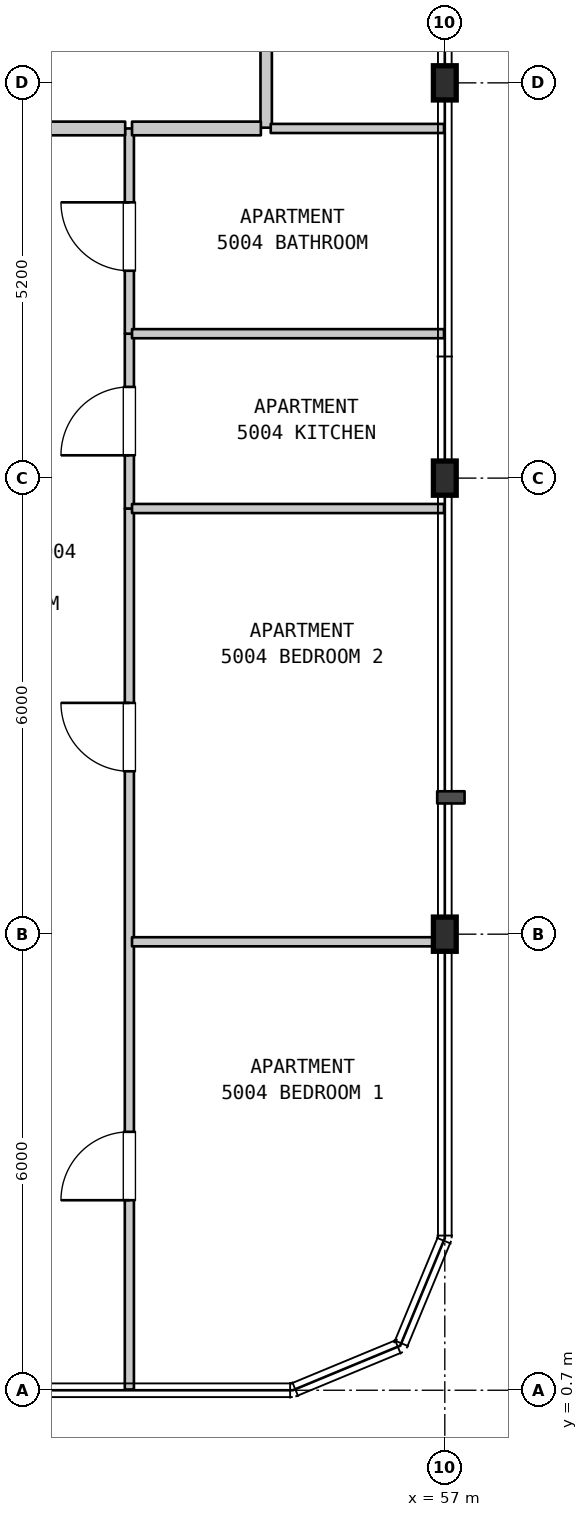
"""IFC4 building model, lengths in metres.
Left out: names, types, materials, properties, quantities, classifications, styles, units other than length and angle.
Written with IfcOpenShell. Run it as: python <this file> out.ifc"""

import sys

from ifc_helpers import new_model, si_unit, direction, frame, frame_2d, origin, origin_2d, place, context, subcontext, project, spatial, rectangle, i_section, extrude, element, fill, save


model = new_model("IFC4")
c1 = context("Model", 3, precision=1e-05, world=origin(), true_north=direction((0.0, 1.0)))
c2 = subcontext(c1, "Body", "Model", "MODEL_VIEW")
j1 = project(units=[si_unit("LENGTHUNIT", "METRE"), si_unit("PLANEANGLEUNIT", "RADIAN")], contexts=[c1])
p1 = place(None, origin())
s1 = spatial("IfcSite", under=j1, at=p1, CompositionType="ELEMENT")
p2 = place(p1, origin())
s2 = spatial("IfcBuilding", under=s1, at=p2, CompositionType="ELEMENT")
p3 = place(p2, frame((0.0, 0.0, 203.2)))
s3 = spatial("IfcBuildingStorey", under=s2, at=p3, CompositionType="ELEMENT", Elevation=203.2)
for number, where, z_axis, x_axis in (
    (1, (57.0, 6.7, 0.0), (0.0, 0.0, 1.0), (1.0, 0.0, 0.0)),
    (2, (57.0, 12.7, 0.0), (0.0, 0.0, 1.0), (1.0, 0.0, 0.0)),
    (3, (57.0, 17.9, 0.0), (0.0, 0.0, 1.0), (1.0, 0.0, 0.0)),
):
    element("IfcColumn", number, at=place(p3, frame(where, z_axis=z_axis, x_axis=x_axis)), inside=s3, PredefinedType="COLUMN", context=c2, shape_type="SweptSolid", body=[
        extrude(i_section(OverallWidth=0.3, OverallDepth=0.45, WebThickness=0.014, FlangeThickness=0.026, FilletRadius=0.027, at=origin_2d()), origin(), (0.0, 0.0, 1.0), 3.7),
    ])
p4 = place(p3, frame((52.85, 0.71, 0.0), z_axis=(0.0, 0.0, 1.0), x_axis=(0.0, 1.0, 0.0)))
e4 = element("IfcWall", 4, at=p4, inside=s3, PredefinedType="PARTITIONING", context=c2, shape_type="SweptSolid", body=[
    extrude(rectangle(XDim=11.59, YDim=0.12, at=frame_2d((5.795, 0.0))), origin(), (0.0, 0.0, 1.0), 3.39),
])
p5 = place(p4, frame((2.49, 0.0, 0.0)))
e5 = element("IfcOpeningElement", 5, at=p5, cuts=e4, PredefinedType="OPENING", context=c2, shape_type="SweptSolid", body=[
    extrude(rectangle(XDim=0.9, YDim=2.15, at=frame_2d((0.45, 1.075))), frame((0.0, 0.07, 0.0), z_axis=(0.0, -1.0, 0.0), x_axis=(1.0, 0.0, 0.0)), (0.0, 0.0, 1.0), 0.14),
])
p6 = place(p4, frame((8.133, 0.0, 0.0)))
e6 = element("IfcOpeningElement", 6, at=p6, cuts=e4, PredefinedType="OPENING", context=c2, shape_type="SweptSolid", body=[
    extrude(rectangle(XDim=0.9, YDim=2.15, at=frame_2d((0.45, 1.075))), frame((0.0, 0.07, 0.0), z_axis=(0.0, -1.0, 0.0), x_axis=(1.0, 0.0, 0.0)), (0.0, 0.0, 1.0), 0.14),
])
p7 = place(p3, frame((52.85, 12.3, 0.0), z_axis=(0.0, 0.0, 1.0), x_axis=(0.0, 1.0, 0.0)))
e7 = element("IfcWall", 7, at=p7, inside=s3, PredefinedType="PARTITIONING", context=c2, shape_type="SweptSolid", body=[
    extrude(rectangle(XDim=2.3, YDim=0.12, at=frame_2d((1.15, 0.0))), origin(), (0.0, 0.0, 1.0), 3.39),
])
p8 = place(p7, frame((0.7, 0.0, 0.0)))
e8 = element("IfcOpeningElement", 8, at=p8, cuts=e7, PredefinedType="OPENING", context=c2, shape_type="SweptSolid", body=[
    extrude(rectangle(XDim=0.9, YDim=2.15, at=frame_2d((0.45, 1.075))), frame((0.0, 0.07, 0.0), z_axis=(0.0, -1.0, 0.0), x_axis=(1.0, 0.0, 0.0)), (0.0, 0.0, 1.0), 0.14),
])
p9 = place(p3, frame((52.85, 14.6, 0.0), z_axis=(0.0, 0.0, 1.0), x_axis=(0.0, 1.0, 0.0)))
e9 = element("IfcWall", 9, at=p9, inside=s3, PredefinedType="PARTITIONING", context=c2, shape_type="SweptSolid", body=[
    extrude(rectangle(XDim=2.7, YDim=0.12, at=frame_2d((1.35, 0.0))), origin(), (0.0, 0.0, 1.0), 3.39),
])
p10 = place(p9, frame((0.828, 0.0, 0.0)))
e10 = element("IfcOpeningElement", 10, at=p10, cuts=e9, PredefinedType="OPENING", context=c2, shape_type="SweptSolid", body=[
    extrude(rectangle(XDim=0.9, YDim=2.1, at=frame_2d((0.45, 1.05))), frame((0.0, 0.07, 0.0), z_axis=(0.0, -1.0, 0.0), x_axis=(1.0, 0.0, 0.0)), (0.0, 0.0, 1.0), 0.14),
])
p11 = place(p3, frame((54.65, 17.31, 0.0), z_axis=(0.0, 0.0, 1.0), x_axis=(0.0, 1.0, 0.0)))
e11 = element("IfcWall", 11, at=p11, inside=s3, PredefinedType="STANDARD", context=c2, shape_type="SweptSolid", body=[
    extrude(rectangle(XDim=2.19, YDim=0.15, at=frame_2d((1.095, 0.0))), origin(), (0.0, 0.0, 1.0), 3.39),
])
p12 = place(p3, frame((52.885, 6.6, 0.0), z_axis=(0.0, 0.0, 1.0), x_axis=(1.0, 0.0, 0.0)))
e12 = element("IfcWall", 12, at=p12, inside=s3, PredefinedType="PARTITIONING", context=c2, shape_type="SweptSolid", body=[
    extrude(rectangle(XDim=4.105, YDim=0.12, at=frame_2d((2.052, 0.0))), origin(), (0.0, 0.0, 1.0), 2.79),
])
for number, where, z_axis, x_axis in (
    (13, (52.885, 12.3, 0.0), (0.0, 0.0, 1.0), (1.0, 0.0, 0.0)),
    (14, (52.885, 14.6, 0.0), (0.0, 0.0, 1.0), (1.0, 0.0, 0.0)),
):
    element("IfcWall", number, at=place(p3, frame(where, z_axis=z_axis, x_axis=x_axis)), inside=s3, PredefinedType="PARTITIONING", context=c2, shape_type="SweptSolid", body=[
        extrude(rectangle(XDim=4.105, YDim=0.12, at=frame_2d((2.052, 0.0))), origin(), (0.0, 0.0, 1.0), 3.39),
    ])
p13 = place(p3, frame((49.285, 17.3, 0.0), z_axis=(0.0, 0.0, 1.0), x_axis=(1.0, 0.0, 0.0)))
e15 = element("IfcWall", 15, at=p13, inside=s3, PredefinedType="STANDARD", context=c2, shape_type="SweptSolid", body=[
    extrude(rectangle(XDim=3.51, YDim=0.18, at=frame_2d((1.755, 0.0))), origin(), (0.0, 0.0, 1.0), 3.39),
])
p14 = place(p13, frame((1.185, 0.0, 0.0)))
e16 = element("IfcOpeningElement", 16, at=p14, cuts=e15, PredefinedType="OPENING", context=c2, shape_type="SweptSolid", body=[
    extrude(rectangle(XDim=1.0, YDim=2.15, at=frame_2d((0.5, 1.075))), frame((0.0, 0.1, 0.0), z_axis=(0.0, -1.0, 0.0), x_axis=(1.0, 0.0, 0.0)), (0.0, 0.0, 1.0), 0.2),
])
p15 = place(p3, frame((52.885, 17.3, 0.0), z_axis=(0.0, 0.0, 1.0), x_axis=(1.0, 0.0, 0.0)))
e17 = element("IfcWall", 17, at=p15, inside=s3, PredefinedType="STANDARD", context=c2, shape_type="SweptSolid", body=[
    extrude(rectangle(XDim=1.695, YDim=0.18, at=frame_2d((0.848, 0.0))), origin(), (0.0, 0.0, 1.0), 3.39),
])
p16 = place(p3, frame((54.71, 17.3, 0.0), z_axis=(0.0, 0.0, 1.0), x_axis=(1.0, 0.0, 0.0)))
e18 = element("IfcWall", 18, at=p16, inside=s3, PredefinedType="PARTITIONING", context=c2, shape_type="SweptSolid", body=[
    extrude(rectangle(XDim=2.28, YDim=0.12, at=frame_2d((1.14, 0.0))), origin(), (0.0, 0.0, 1.0), 3.39),
])
p17 = place(p5, origin())
e19 = element("IfcDoor", 19, at=p17, inside=s3, OperationType="SINGLE_SWING_LEFT", PredefinedType="DOOR", context=c2, shape_type="SweptSolid", body=[
    extrude(rectangle(XDim=0.9, YDim=2.15, at=frame_2d((0.45, 1.075))), frame((0.0, 0.025, 0.0), z_axis=(0.0, -1.0, 0.0), x_axis=(1.0, 0.0, 0.0)), (0.0, 0.0, 1.0), 0.05),
])
fill(e5, e19)
p18 = place(p6, origin())
e20 = element("IfcDoor", 20, at=p18, inside=s3, OperationType="SINGLE_SWING_RIGHT", PredefinedType="DOOR", context=c2, shape_type="SweptSolid", body=[
    extrude(rectangle(XDim=0.9, YDim=2.15, at=frame_2d((0.45, 1.075))), frame((0.0, 0.025, 0.0), z_axis=(0.0, -1.0, 0.0), x_axis=(1.0, 0.0, 0.0)), (0.0, 0.0, 1.0), 0.05),
])
fill(e6, e20)
p19 = place(p8, origin())
e21 = element("IfcDoor", 21, at=p19, inside=s3, OperationType="SINGLE_SWING_LEFT", PredefinedType="DOOR", context=c2, shape_type="SweptSolid", body=[
    extrude(rectangle(XDim=0.9, YDim=2.15, at=frame_2d((0.45, 1.075))), frame((0.0, 0.025, 0.0), z_axis=(0.0, -1.0, 0.0), x_axis=(1.0, 0.0, 0.0)), (0.0, 0.0, 1.0), 0.05),
])
fill(e8, e21)
p20 = place(p10, origin())
e22 = element("IfcDoor", 22, at=p20, inside=s3, OperationType="SINGLE_SWING_RIGHT", PredefinedType="DOOR", context=c2, shape_type="SweptSolid", body=[
    extrude(rectangle(XDim=0.9, YDim=2.1, at=frame_2d((0.45, 1.05))), frame((0.0, 0.025, 0.0), z_axis=(0.0, -1.0, 0.0), x_axis=(1.0, 0.0, 0.0)), (0.0, 0.0, 1.0), 0.05),
])
fill(e10, e22)
save(model, sys.argv[1])
